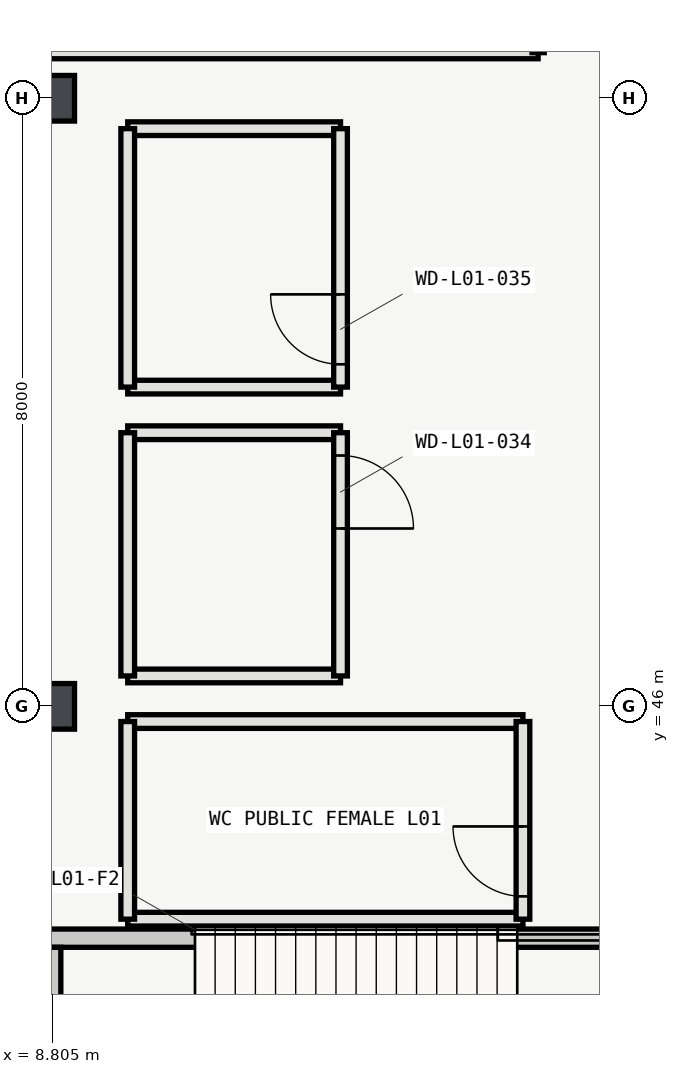
"""IFC4 building model, lengths in metres.
Left out: names, types, materials, properties, quantities, classifications, styles, units other than length and angle.
Written with IfcOpenShell. Run it as: python <this file> out.ifc"""

import sys

from ifc_helpers import new_model, si_unit, direction, frame, frame_2d, origin, origin_2d, place, context, subcontext, project, spatial, rectangle, hollow_rectangle, extrude, element, fill, save


model = new_model("IFC4")
c1 = context("Model", 3, precision=1e-05, world=origin(), true_north=direction((0.0, 1.0)))
c2 = subcontext(c1, "Body", "Model", "MODEL_VIEW")
j1 = project(units=[si_unit("LENGTHUNIT", "METRE"), si_unit("PLANEANGLEUNIT", "RADIAN")], contexts=[c1])
p1 = place(None, origin())
s1 = spatial("IfcSite", under=j1, at=p1, CompositionType="ELEMENT")
p2 = place(p1, origin())
s2 = spatial("IfcBuilding", under=s1, at=p2, CompositionType="ELEMENT")
p3 = place(p2, frame((0.0, 0.0, 5.4)))
s3 = spatial("IfcBuildingStorey", under=s2, at=p3, CompositionType="ELEMENT", Elevation=5.4)
for number, where, z_axis, x_axis in (
    (1, (8.8, 46.0, 0.0), (0.0, 0.0, 1.0), (1.0, 0.0, 0.0)),
    (2, (8.8, 54.0, 0.0), (0.0, 0.0, 1.0), (1.0, 0.0, 0.0)),
):
    element("IfcColumn", number, at=place(p3, frame(where, z_axis=z_axis, x_axis=x_axis)), inside=s3, PredefinedType="COLUMN", context=c2, shape_type="SweptSolid", body=[
        extrude(hollow_rectangle(XDim=0.6, YDim=0.6, WallThickness=0.024, InnerFilletRadius=0.024, OuterFilletRadius=0.048, at=origin_2d()), origin(), (0.0, 0.0, 1.0), 5.4),
    ])
for number, where, z_axis, x_axis in (
    (3, (9.8, 46.4, 0.0), (0.0, 0.0, 1.0), (1.0, 0.0, 0.0)),
    (4, (12.6, 49.6, 0.0), (0.0, 0.0, 1.0), (-1.0, 0.0, 0.0)),
):
    element("IfcWall", number, at=place(p3, frame(where, z_axis=z_axis, x_axis=x_axis)), inside=s3, PredefinedType="PLUMBINGWALL", context=c2, shape_type="SweptSolid", body=[
        extrude(rectangle(XDim=2.8, YDim=0.18, at=frame_2d((1.4, 0.0))), origin(), (0.0, 0.0, 1.0), 5.12),
    ])
p4 = place(p3, frame((9.8, 49.6, 0.0), z_axis=(0.0, 0.0, 1.0), x_axis=(0.0, -1.0, 0.0)))
e5 = element("IfcWall", 5, at=p4, inside=s3, PredefinedType="PLUMBINGWALL", context=c2, shape_type="SweptSolid", body=[
    extrude(rectangle(XDim=3.2, YDim=0.18, at=frame_2d((1.6, 0.0))), origin(), (0.0, 0.0, 1.0), 5.12),
])
p5 = place(p3, frame((12.6, 46.4, 0.0), z_axis=(0.0, 0.0, 1.0), x_axis=(0.0, 1.0, 0.0)))
e6 = element("IfcWall", 6, at=p5, inside=s3, PredefinedType="PLUMBINGWALL", context=c2, shape_type="SweptSolid", body=[
    extrude(rectangle(XDim=3.2, YDim=0.18, at=frame_2d((1.6, 0.0))), origin(), (0.0, 0.0, 1.0), 5.12),
])
p6 = place(p5, frame((1.94, 0.0, 0.0)))
e7 = element("IfcOpeningElement", 7, at=p6, cuts=e6, PredefinedType="OPENING", context=c2, shape_type="SweptSolid", body=[
    extrude(rectangle(XDim=0.96, YDim=2.1, at=frame_2d((0.48, 1.05))), frame((0.0, 0.1, 0.0), z_axis=(0.0, -1.0, 0.0), x_axis=(1.0, 0.0, 0.0)), (0.0, 0.0, 1.0), 0.2),
])
for number, where, z_axis, x_axis in (
    (8, (9.8, 50.2, 0.0), (0.0, 0.0, 1.0), (1.0, 0.0, 0.0)),
    (9, (12.6, 53.6, 0.0), (0.0, 0.0, 1.0), (-1.0, 0.0, 0.0)),
):
    element("IfcWall", number, at=place(p3, frame(where, z_axis=z_axis, x_axis=x_axis)), inside=s3, PredefinedType="PLUMBINGWALL", context=c2, shape_type="SweptSolid", body=[
        extrude(rectangle(XDim=2.8, YDim=0.18, at=frame_2d((1.4, 0.0))), origin(), (0.0, 0.0, 1.0), 5.12),
    ])
p7 = place(p3, frame((9.8, 53.6, 0.0), z_axis=(0.0, 0.0, 1.0), x_axis=(0.0, -1.0, 0.0)))
e10 = element("IfcWall", 10, at=p7, inside=s3, PredefinedType="PLUMBINGWALL", context=c2, shape_type="SweptSolid", body=[
    extrude(rectangle(XDim=3.4, YDim=0.18, at=frame_2d((1.7, 0.0))), origin(), (0.0, 0.0, 1.0), 5.12),
])
p8 = place(p3, frame((12.6, 50.2, 0.0), z_axis=(0.0, 0.0, 1.0), x_axis=(0.0, 1.0, 0.0)))
e11 = element("IfcWall", 11, at=p8, inside=s3, PredefinedType="PLUMBINGWALL", context=c2, shape_type="SweptSolid", body=[
    extrude(rectangle(XDim=3.4, YDim=0.18, at=frame_2d((1.7, 0.0))), origin(), (0.0, 0.0, 1.0), 5.12),
])
p9 = place(p8, frame((0.3, 0.0, 0.0)))
e12 = element("IfcOpeningElement", 12, at=p9, cuts=e11, PredefinedType="OPENING", context=c2, shape_type="SweptSolid", body=[
    extrude(rectangle(XDim=0.92, YDim=2.1, at=frame_2d((0.46, 1.05))), frame((0.0, 0.1, 0.0), z_axis=(0.0, -1.0, 0.0), x_axis=(1.0, 0.0, 0.0)), (0.0, 0.0, 1.0), 0.2),
])
p10 = place(p3, frame((9.8, 43.2, 0.0), z_axis=(0.0, 0.0, 1.0), x_axis=(1.0, 0.0, 0.0)))
e13 = element("IfcWall", 13, at=p10, inside=s3, PredefinedType="PLUMBINGWALL", context=c2, shape_type="SweptSolid", body=[
    extrude(rectangle(XDim=5.2, YDim=0.18, at=frame_2d((2.6, 0.0))), origin(), (0.0, 0.0, 1.0), 5.12),
])
p11 = place(p3, frame((15.0, 45.8, 0.0), z_axis=(0.0, 0.0, 1.0), x_axis=(-1.0, 0.0, 0.0)))
e14 = element("IfcWall", 14, at=p11, inside=s3, PredefinedType="PLUMBINGWALL", context=c2, shape_type="SweptSolid", body=[
    extrude(rectangle(XDim=5.2, YDim=0.18, at=frame_2d((2.6, 0.0))), origin(), (0.0, 0.0, 1.0), 4.826),
])
p12 = place(p3, frame((9.8, 45.8, 0.0), z_axis=(0.0, 0.0, 1.0), x_axis=(0.0, -1.0, 0.0)))
e15 = element("IfcWall", 15, at=p12, inside=s3, PredefinedType="PLUMBINGWALL", context=c2, shape_type="SweptSolid", body=[
    extrude(rectangle(XDim=2.6, YDim=0.18, at=frame_2d((1.3, 0.0))), origin(), (0.0, 0.0, 1.0), 5.12),
])
p13 = place(p3, frame((15.0, 43.2, 0.0), z_axis=(0.0, 0.0, 1.0), x_axis=(0.0, 1.0, 0.0)))
e16 = element("IfcWall", 16, at=p13, inside=s3, PredefinedType="PLUMBINGWALL", context=c2, shape_type="SweptSolid", body=[
    extrude(rectangle(XDim=2.6, YDim=0.18, at=frame_2d((1.3, 0.0))), origin(), (0.0, 0.0, 1.0), 5.12),
])
p14 = place(p13, frame((0.3, 0.0, 0.0)))
e17 = element("IfcOpeningElement", 17, at=p14, cuts=e16, PredefinedType="OPENING", context=c2, shape_type="SweptSolid", body=[
    extrude(rectangle(XDim=0.92, YDim=2.1, at=frame_2d((0.46, 1.05))), frame((0.0, 0.1, 0.0), z_axis=(0.0, -1.0, 0.0), x_axis=(1.0, 0.0, 0.0)), (0.0, 0.0, 1.0), 0.2),
])
p15 = place(p3, frame((0.8, 54.6, 0.0), z_axis=(0.0, 0.0, 1.0), x_axis=(1.0, 0.0, 0.0)))
e18 = element("IfcWall", 18, at=p15, inside=s3, PredefinedType="PARTITIONING", context=c2, shape_type="SweptSolid", body=[
    extrude(rectangle(XDim=14.4, YDim=0.16, at=frame_2d((7.2, 0.0))), origin(), (0.0, 0.0, 1.0), 5.12),
])
p16 = place(p3, frame((17.72, 42.95, 0.0), z_axis=(0.0, 0.0, 1.0), x_axis=(-1.0, 0.0, 0.0)))
e19 = element("IfcWall", 19, at=p16, inside=s3, PredefinedType="SHEAR", context=c2, shape_type="SweptSolid", body=[
    extrude(rectangle(XDim=9.04, YDim=0.24, at=frame_2d((4.52, 0.0))), origin(), (0.0, 0.0, 1.0), 5.12),
])
p17 = place(p3, frame((8.8, 38.67, 0.0), z_axis=(0.0, 0.0, 1.0), x_axis=(0.0, 1.0, 0.0)))
e20 = element("IfcWall", 20, at=p17, inside=s3, PredefinedType="SHEAR", context=c2, shape_type="SweptSolid", body=[
    extrude(rectangle(XDim=4.16, YDim=0.24, at=frame_2d((2.08, 0.0))), origin(), (0.0, 0.0, 1.0), 5.12),
])
p18 = place(p17, frame((1.405, 0.0, 0.0)))
e21 = element("IfcOpeningElement", 21, at=p18, cuts=e20, PredefinedType="OPENING", context=c2, shape_type="SweptSolid", body=[
    extrude(rectangle(XDim=1.35, YDim=2.2, at=frame_2d((0.675, 1.1))), frame((0.0, 0.13, 0.0), z_axis=(0.0, -1.0, 0.0), x_axis=(1.0, 0.0, 0.0)), (0.0, 0.0, 1.0), 0.26),
])
p19 = place(p6, origin())
e22 = element("IfcDoor", 22, at=p19, inside=s3, OperationType="SINGLE_SWING_LEFT", PredefinedType="DOOR", context=c2, shape_type="SweptSolid", body=[
    extrude(rectangle(XDim=0.96, YDim=2.1, at=frame_2d((0.48, 1.05))), frame((0.0, 0.025, 0.0), z_axis=(0.0, -1.0, 0.0), x_axis=(1.0, 0.0, 0.0)), (0.0, 0.0, 1.0), 0.05),
])
fill(e7, e22)
p20 = place(p9, origin())
e23 = element("IfcDoor", 23, at=p20, inside=s3, OperationType="SINGLE_SWING_RIGHT", PredefinedType="DOOR", context=c2, shape_type="SweptSolid", body=[
    extrude(rectangle(XDim=0.92, YDim=2.1, at=frame_2d((0.46, 1.05))), frame((0.0, 0.025, 0.0), z_axis=(0.0, -1.0, 0.0), x_axis=(1.0, 0.0, 0.0)), (0.0, 0.0, 1.0), 0.05),
])
fill(e12, e23)
p21 = place(p14, origin())
e24 = element("IfcDoor", 24, at=p21, inside=s3, OperationType="SINGLE_SWING_RIGHT", PredefinedType="DOOR", context=c2, shape_type="SweptSolid", body=[
    extrude(rectangle(XDim=0.92, YDim=2.1, at=frame_2d((0.46, 1.05))), frame((0.0, 0.025, 0.0), z_axis=(0.0, -1.0, 0.0), x_axis=(1.0, 0.0, 0.0)), (0.0, 0.0, 1.0), 0.05),
])
fill(e17, e24)
save(model, sys.argv[1])
